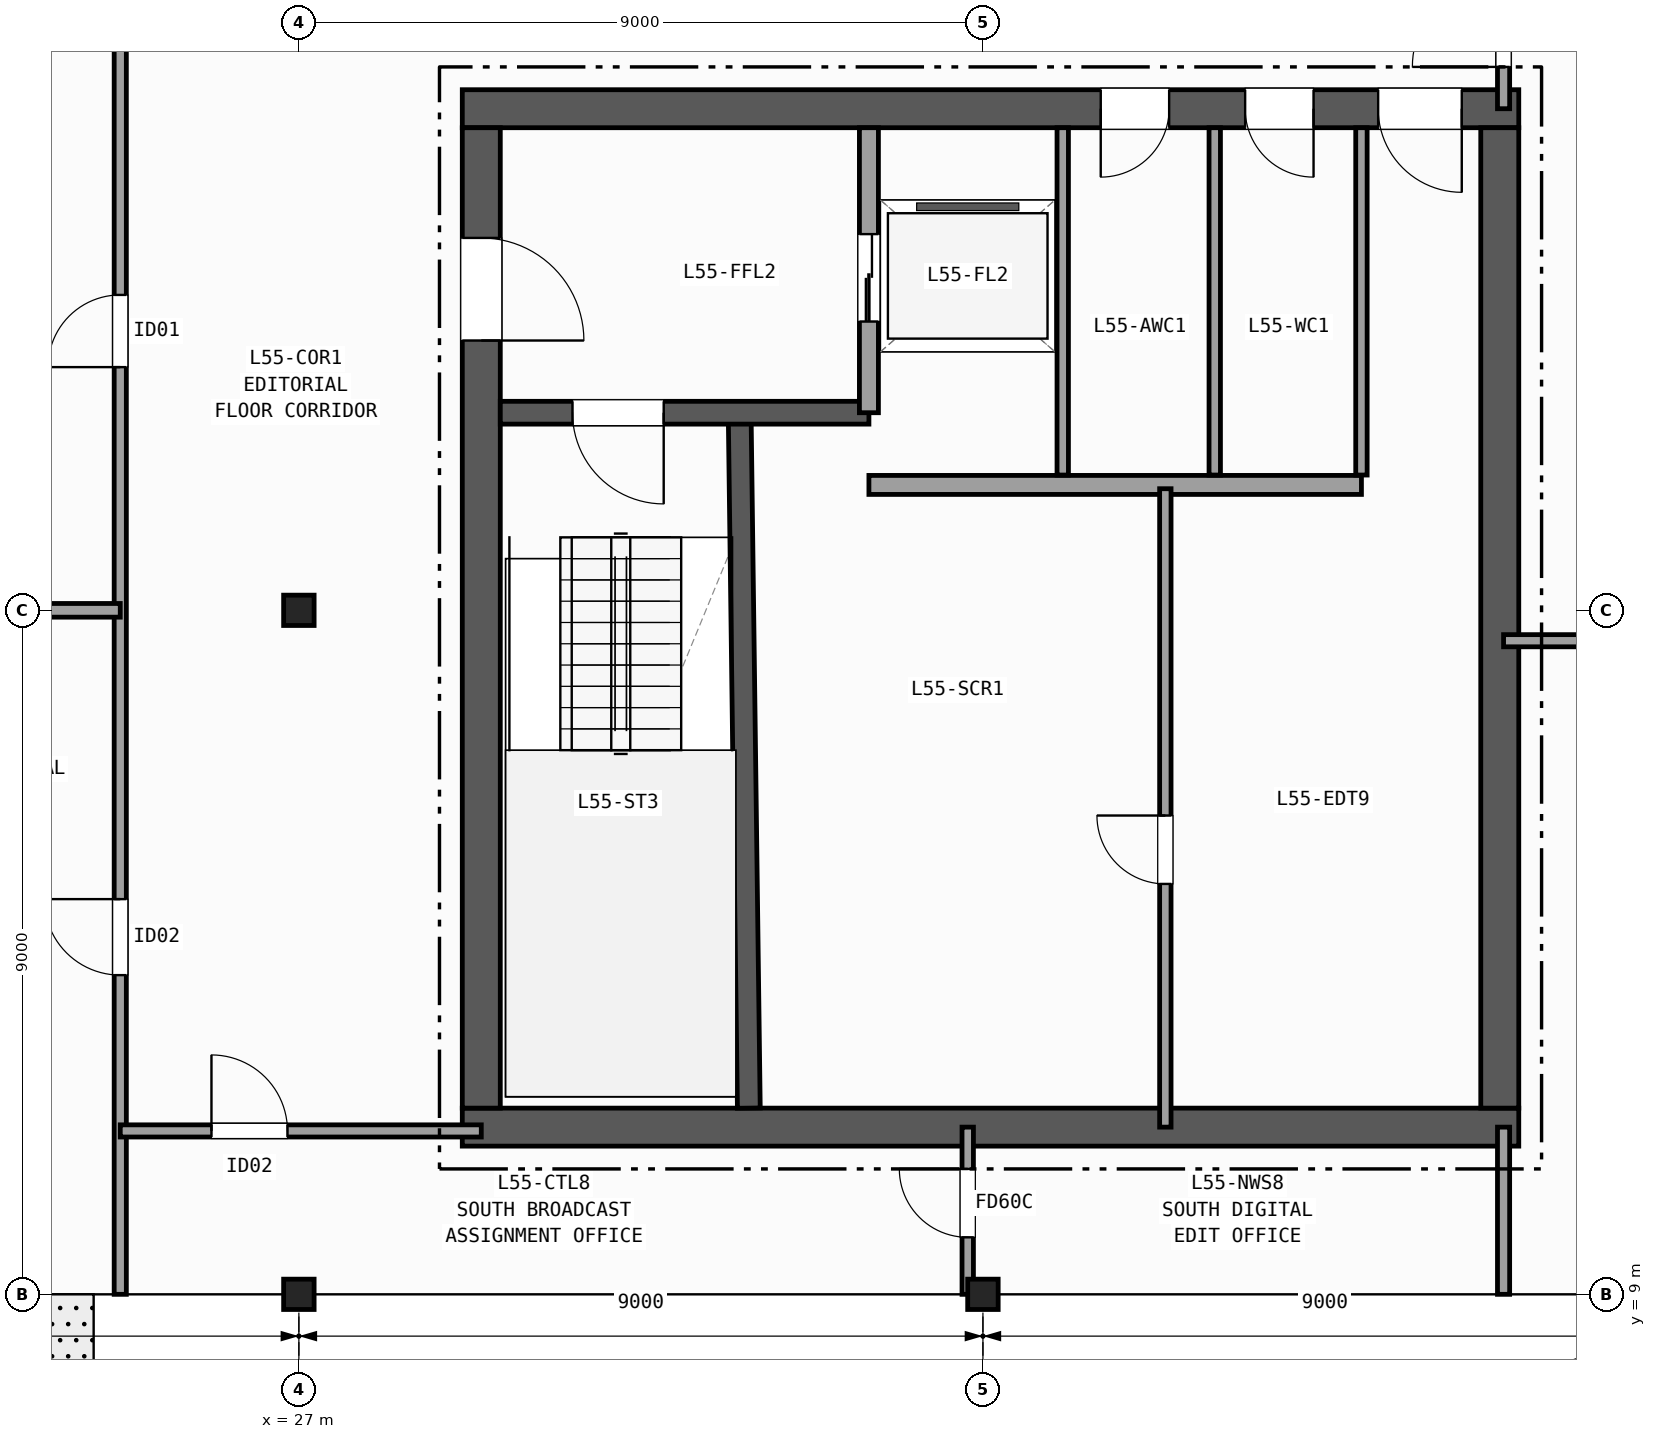
"""IFC4 building model, lengths in metres.
Left out: names, types, materials, properties, quantities, classifications, styles, units other than length and angle.
Written with IfcOpenShell. Run it as: python <this file> out.ifc"""

import sys

from ifc_helpers import new_model, si_unit, direction, frame, frame_2d, origin, origin_2d, place, context, subcontext, project, spatial, rectangle, i_section, extrude, element, fill, save


model = new_model("IFC4")
c1 = context("Model", 3, precision=1e-05, world=origin(), true_north=direction((0.0, 1.0)))
c2 = subcontext(c1, "Body", "Model", "MODEL_VIEW")
j1 = project(units=[si_unit("LENGTHUNIT", "METRE"), si_unit("PLANEANGLEUNIT", "RADIAN")], contexts=[c1])
p1 = place(None, origin())
s1 = spatial("IfcSite", under=j1, at=p1, CompositionType="ELEMENT")
p2 = place(p1, origin())
s2 = spatial("IfcBuilding", under=s1, at=p2, CompositionType="ELEMENT")
p3 = place(p2, frame((0.0, 0.0, 221.0)))
s3 = spatial("IfcBuildingStorey", under=s2, at=p3, CompositionType="ELEMENT", Elevation=221.0)
for number, where, z_axis, x_axis in (
    (1, (27.0, 9.0, 0.0), (0.0, 0.0, 1.0), (1.0, 0.0, 0.0)),
    (2, (27.0, 18.0, 0.0), (0.0, 0.0, 1.0), (1.0, 0.0, 0.0)),
    (3, (36.0, 9.0, 0.0), (0.0, 0.0, 1.0), (1.0, 0.0, 0.0)),
):
    element("IfcColumn", number, at=place(p3, frame(where, z_axis=z_axis, x_axis=x_axis)), inside=s3, PredefinedType="COLUMN", context=c2, shape_type="SweptSolid", body=[
        extrude(i_section(OverallWidth=0.401, OverallDepth=0.399, WebThickness=0.025, FlangeThickness=0.04, FilletRadius=0.015, at=origin_2d()), origin(), (0.0, 0.0, 1.0), 3.7),
    ])
p4 = place(p3, frame((29.15, 11.2, 0.0), z_axis=(0.0, 0.0, 1.0), x_axis=(1.0, 0.0, 0.0)))
e4 = element("IfcWall", 4, at=p4, inside=s3, PredefinedType="SHEAR", context=c2, shape_type="SweptSolid", body=[
    extrude(rectangle(XDim=13.9, YDim=0.5, at=frame_2d((6.95, 0.0))), origin(), (0.0, 0.0, 1.0), 3.42),
])
p5 = place(p3, frame((43.05, 24.6, 0.0), z_axis=(0.0, 0.0, 1.0), x_axis=(-1.0, 0.0, 0.0)))
e5 = element("IfcWall", 5, at=p5, inside=s3, PredefinedType="SHEAR", context=c2, shape_type="SweptSolid", body=[
    extrude(rectangle(XDim=13.9, YDim=0.5, at=frame_2d((6.95, 0.0))), origin(), (0.0, 0.0, 1.0), 3.42),
])
p6 = place(p5, frame((0.75, 0.0, 0.0)))
e6 = element("IfcOpeningElement", 6, at=p6, cuts=e5, PredefinedType="OPENING", context=c2, shape_type="SweptSolid", body=[
    extrude(rectangle(XDim=1.1, YDim=2.15, at=frame_2d((0.55, 1.075))), frame((0.0, 0.26, 0.0), z_axis=(0.0, -1.0, 0.0), x_axis=(1.0, 0.0, 0.0)), (0.0, 0.0, 1.0), 0.52),
])
p7 = place(p5, frame((2.7, 0.0, 0.0)))
e7 = element("IfcOpeningElement", 7, at=p7, cuts=e5, PredefinedType="OPENING", context=c2, shape_type="SweptSolid", body=[
    extrude(rectangle(XDim=0.9, YDim=2.1, at=frame_2d((0.45, 1.05))), frame((0.0, 0.26, 0.0), z_axis=(0.0, -1.0, 0.0), x_axis=(1.0, 0.0, 0.0)), (0.0, 0.0, 1.0), 0.52),
])
p8 = place(p5, frame((4.6, 0.0, 0.0)))
e8 = element("IfcOpeningElement", 8, at=p8, cuts=e5, PredefinedType="OPENING", context=c2, shape_type="SweptSolid", body=[
    extrude(rectangle(XDim=0.9, YDim=2.1, at=frame_2d((0.45, 1.05))), frame((0.0, 0.26, 0.0), z_axis=(0.0, -1.0, 0.0), x_axis=(1.0, 0.0, 0.0)), (0.0, 0.0, 1.0), 0.52),
])
p9 = place(p3, frame((29.4, 24.35, 0.0), z_axis=(0.0, 0.0, 1.0), x_axis=(0.0, -1.0, 0.0)))
e9 = element("IfcWall", 9, at=p9, inside=s3, PredefinedType="SHEAR", context=c2, shape_type="SweptSolid", body=[
    extrude(rectangle(XDim=12.9, YDim=0.5, at=frame_2d((6.45, 0.0))), origin(), (0.0, 0.0, 1.0), 3.42),
])
p10 = place(p9, frame((1.45, 0.0, 0.0)))
e10 = element("IfcOpeningElement", 10, at=p10, cuts=e9, PredefinedType="OPENING", context=c2, shape_type="SweptSolid", body=[
    extrude(rectangle(XDim=1.35, YDim=2.15, at=frame_2d((0.675, 1.075))), frame((0.0, 0.26, 0.0), z_axis=(0.0, -1.0, 0.0), x_axis=(1.0, 0.0, 0.0)), (0.0, 0.0, 1.0), 0.52),
])
p11 = place(p3, frame((42.8, 11.45, 0.0), z_axis=(0.0, 0.0, 1.0), x_axis=(0.0, 1.0, 0.0)))
e11 = element("IfcWall", 11, at=p11, inside=s3, PredefinedType="SHEAR", context=c2, shape_type="SweptSolid", body=[
    extrude(rectangle(XDim=12.9, YDim=0.5, at=frame_2d((6.45, 0.0))), origin(), (0.0, 0.0, 1.0), 3.42),
])
p12 = place(p3, frame((32.92, 11.45, 0.0), z_axis=(0.0, 0.0, 1.0), x_axis=(-0.013171578211, 0.999913251001, 0.0)))
e12 = element("IfcWall", 12, at=p12, inside=s3, PredefinedType="SHEAR", context=c2, shape_type="SweptSolid", body=[
    extrude(rectangle(XDim=9.101, YDim=0.3, at=frame_2d((4.55, 0.0))), origin(), (0.0, 0.0, 1.0), 3.42),
])
p13 = place(p3, frame((34.5, 20.6, 0.0), z_axis=(0.0, 0.0, 1.0), x_axis=(-1.0, 0.0, 0.0)))
e13 = element("IfcWall", 13, at=p13, inside=s3, PredefinedType="SHEAR", context=c2, shape_type="SweptSolid", body=[
    extrude(rectangle(XDim=4.85, YDim=0.3, at=frame_2d((2.425, 0.0))), origin(), (0.0, 0.0, 1.0), 3.42),
])
p14 = place(p13, frame((2.7, 0.0, 0.0)))
e14 = element("IfcOpeningElement", 14, at=p14, cuts=e13, PredefinedType="OPENING", context=c2, shape_type="SweptSolid", body=[
    extrude(rectangle(XDim=1.2, YDim=2.15, at=frame_2d((0.6, 1.075))), frame((0.0, 0.16, 0.0), z_axis=(0.0, -1.0, 0.0), x_axis=(1.0, 0.0, 0.0)), (0.0, 0.0, 1.0), 0.32),
])
p15 = place(p3, frame((34.5, 20.6, 0.0), z_axis=(0.0, 0.0, 1.0), x_axis=(0.0, 1.0, 0.0)))
e15 = element("IfcWall", 15, at=p15, inside=s3, PredefinedType="PARTITIONING", context=c2, shape_type="SweptSolid", body=[
    extrude(rectangle(XDim=3.75, YDim=0.25, at=frame_2d((1.875, 0.0))), origin(), (0.0, 0.0, 1.0), 3.42),
])
p16 = place(p15, frame((1.2, 0.0, 0.0)))
e16 = element("IfcOpeningElement", 16, at=p16, cuts=e15, PredefinedType="OPENING", context=c2, shape_type="SweptSolid", body=[
    extrude(rectangle(XDim=1.15, YDim=2.15, at=frame_2d((0.575, 1.075))), frame((0.0, 0.135, 0.0), z_axis=(0.0, -1.0, 0.0), x_axis=(1.0, 0.0, 0.0)), (0.0, 0.0, 1.0), 0.27),
])
p17 = place(p3, frame((34.5, 19.65, 0.0), z_axis=(0.0, 0.0, 1.0), x_axis=(1.0, 0.0, 0.0)))
e17 = element("IfcWall", 17, at=p17, inside=s3, PredefinedType="PARTITIONING", context=c2, shape_type="SweptSolid", body=[
    extrude(rectangle(XDim=6.48, YDim=0.25, at=frame_2d((3.24, 0.0))), origin(), (0.0, 0.0, 1.0), 3.42),
])
p18 = place(p3, frame((38.4, 11.2, 0.0), z_axis=(0.0, 0.0, 1.0), x_axis=(0.0, 1.0, 0.0)))
e18 = element("IfcWall", 18, at=p18, inside=s3, PredefinedType="PARTITIONING", context=c2, shape_type="SweptSolid", body=[
    extrude(rectangle(XDim=8.4, YDim=0.15, at=frame_2d((4.2, 0.0))), origin(), (0.0, 0.0, 1.0), 3.42),
])
p19 = place(p18, frame((3.2, 0.0, 0.0)))
e19 = element("IfcOpeningElement", 19, at=p19, cuts=e18, PredefinedType="OPENING", context=c2, shape_type="SweptSolid", body=[
    extrude(rectangle(XDim=0.9, YDim=2.1, at=frame_2d((0.45, 1.05))), frame((0.0, 0.085, 0.0), z_axis=(0.0, -1.0, 0.0), x_axis=(1.0, 0.0, 0.0)), (0.0, 0.0, 1.0), 0.17),
])
for number, where, z_axis, x_axis in (
    (20, (37.05, 19.78, 0.0), (0.0, 0.0, 1.0), (0.0, 1.0, 0.0)),
    (21, (39.05, 19.78, 0.0), (0.0, 0.0, 1.0), (0.0, 1.0, 0.0)),
    (22, (40.98, 19.78, 0.0), (0.0, 0.0, 1.0), (0.0, 1.0, 0.0)),
):
    element("IfcWall", number, at=place(p3, frame(where, z_axis=z_axis, x_axis=x_axis)), inside=s3, PredefinedType="PARTITIONING", context=c2, shape_type="SweptSolid", body=[
        extrude(rectangle(XDim=4.57, YDim=0.15, at=frame_2d((2.285, 0.0))), origin(), (0.0, 0.0, 1.0), 3.42),
    ])
p20 = place(p3, frame((24.65, 9.0, 0.0), z_axis=(0.0, 0.0, 1.0), x_axis=(0.0, 1.0, 0.0)))
e23 = element("IfcWall", 23, at=p20, inside=s3, PredefinedType="PARTITIONING", context=c2, shape_type="SweptSolid", body=[
    extrude(rectangle(XDim=19.2, YDim=0.16, at=frame_2d((9.6, 0.0))), origin(), (0.0, 0.0, 1.0), 2.707),
])
p21 = place(p20, frame((12.2, 0.0, 0.0)))
e24 = element("IfcOpeningElement", 24, at=p21, cuts=e23, PredefinedType="OPENING", context=c2, shape_type="SweptSolid", body=[
    extrude(rectangle(XDim=0.95, YDim=2.1, at=frame_2d((0.475, 1.05))), frame((0.0, 0.09, 0.0), z_axis=(0.0, -1.0, 0.0), x_axis=(1.0, 0.0, 0.0)), (0.0, 0.0, 1.0), 0.18),
])
p22 = place(p20, frame((4.2, 0.0, 0.0)))
e25 = element("IfcOpeningElement", 25, at=p22, cuts=e23, PredefinedType="OPENING", context=c2, shape_type="SweptSolid", body=[
    extrude(rectangle(XDim=1.0, YDim=2.1, at=frame_2d((0.5, 1.05))), frame((0.0, 0.09, 0.0), z_axis=(0.0, -1.0, 0.0), x_axis=(1.0, 0.0, 0.0)), (0.0, 0.0, 1.0), 0.18),
])
p23 = place(p3, frame((9.0, 18.0, 0.0), z_axis=(0.0, 0.0, 1.0), x_axis=(1.0, 0.0, 0.0)))
e26 = element("IfcWall", 26, at=p23, inside=s3, PredefinedType="PARTITIONING", context=c2, shape_type="SweptSolid", body=[
    extrude(rectangle(XDim=15.65, YDim=0.18, at=frame_2d((7.825, 0.0))), origin(), (0.0, 0.0, 1.0), 2.707),
])
p24 = place(p3, frame((24.65, 11.15, 0.0), z_axis=(0.0, 0.0, 1.0), x_axis=(1.0, 0.0, 0.0)))
e27 = element("IfcWall", 27, at=p24, inside=s3, PredefinedType="PARTITIONING", context=c2, shape_type="SweptSolid", body=[
    extrude(rectangle(XDim=4.75, YDim=0.16, at=frame_2d((2.375, 0.0))), origin(), (0.0, 0.0, 1.0), 2.792),
])
p25 = place(p24, frame((1.2, 0.0, 0.0)))
e28 = element("IfcOpeningElement", 28, at=p25, cuts=e27, PredefinedType="OPENING", context=c2, shape_type="SweptSolid", body=[
    extrude(rectangle(XDim=1.0, YDim=2.1, at=frame_2d((0.5, 1.05))), frame((0.0, 0.09, 0.0), z_axis=(0.0, -1.0, 0.0), x_axis=(1.0, 0.0, 0.0)), (0.0, 0.0, 1.0), 0.18),
])
p26 = place(p3, frame((35.8, 9.0, 0.0), z_axis=(0.0, 0.0, 1.0), x_axis=(0.0, 1.0, 0.0)))
e29 = element("IfcWall", 29, at=p26, inside=s3, PredefinedType="PARTITIONING", context=c2, shape_type="SweptSolid", body=[
    extrude(rectangle(XDim=2.2, YDim=0.15, at=frame_2d((1.1, 0.0))), origin(), (0.0, 0.0, 1.0), 2.707),
])
p27 = place(p26, frame((0.75, 0.0, 0.0)))
e30 = element("IfcOpeningElement", 30, at=p27, cuts=e29, PredefinedType="OPENING", context=c2, shape_type="SweptSolid", body=[
    extrude(rectangle(XDim=0.9, YDim=2.1, at=frame_2d((0.45, 1.05))), frame((0.0, 0.085, 0.0), z_axis=(0.0, -1.0, 0.0), x_axis=(1.0, 0.0, 0.0)), (0.0, 0.0, 1.0), 0.17),
])
p28 = place(p3, frame((42.85, 9.0, 0.0), z_axis=(0.0, 0.0, 1.0), x_axis=(0.0, 1.0, 0.0)))
e31 = element("IfcWall", 31, at=p28, inside=s3, PredefinedType="PARTITIONING", context=c2, shape_type="SweptSolid", body=[
    extrude(rectangle(XDim=2.2, YDim=0.16, at=frame_2d((1.1, 0.0))), origin(), (0.0, 0.0, 1.0), 2.707),
])
p29 = place(p3, frame((42.85, 24.6, 0.0), z_axis=(0.0, 0.0, 1.0), x_axis=(0.0, 1.0, 0.0)))
e32 = element("IfcWall", 32, at=p29, inside=s3, PredefinedType="PARTITIONING", context=c2, shape_type="SweptSolid", body=[
    extrude(rectangle(XDim=2.4, YDim=0.16, at=frame_2d((1.2, 0.0))), origin(), (0.0, 0.0, 1.0), 2.707),
])
p30 = place(p29, frame((0.55, 0.0, 0.0)))
e33 = element("IfcOpeningElement", 33, at=p30, cuts=e32, PredefinedType="OPENING", context=c2, shape_type="SweptSolid", body=[
    extrude(rectangle(XDim=1.2, YDim=2.15, at=frame_2d((0.6, 1.075))), frame((0.0, 0.09, 0.0), z_axis=(0.0, -1.0, 0.0), x_axis=(1.0, 0.0, 0.0)), (0.0, 0.0, 1.0), 0.18),
])
p31 = place(p3, frame((42.85, 17.6, 0.0), z_axis=(0.0, 0.0, 1.0), x_axis=(1.0, 0.0, 0.0)))
e34 = element("IfcWall", 34, at=p31, inside=s3, PredefinedType="PARTITIONING", context=c2, shape_type="SweptSolid", body=[
    extrude(rectangle(XDim=11.15, YDim=0.16, at=frame_2d((5.575, 0.0))), origin(), (0.0, 0.0, 1.0), 3.42),
])
p32 = place(p31, frame((2.95, 0.0, 0.0)))
e35 = element("IfcOpeningElement", 35, at=p32, cuts=e34, PredefinedType="OPENING", context=c2, shape_type="SweptSolid", body=[
    extrude(rectangle(XDim=0.86, YDim=2.05, at=frame_2d((0.43, 1.025))), frame((0.0, 0.09, 0.0), z_axis=(0.0, -1.0, 0.0), x_axis=(1.0, 0.0, 0.0)), (0.0, 0.0, 1.0), 0.18),
])
p33 = place(p14, origin())
e36 = element("IfcDoor", 36, at=p33, inside=s3, OperationType="SINGLE_SWING_LEFT", PredefinedType="DOOR", context=c2, shape_type="SweptSolid", body=[
    extrude(rectangle(XDim=1.2, YDim=2.15, at=frame_2d((0.6, 1.075))), frame((0.0, 0.025, 0.0), z_axis=(0.0, -1.0, 0.0), x_axis=(1.0, 0.0, 0.0)), (0.0, 0.0, 1.0), 0.05),
])
fill(e14, e36)
p34 = place(p10, origin())
e37 = element("IfcDoor", 37, at=p34, inside=s3, OperationType="SINGLE_SWING_RIGHT", PredefinedType="DOOR", context=c2, shape_type="SweptSolid", body=[
    extrude(rectangle(XDim=1.35, YDim=2.15, at=frame_2d((0.675, 1.075))), frame((0.0, 0.025, 0.0), z_axis=(0.0, -1.0, 0.0), x_axis=(1.0, 0.0, 0.0)), (0.0, 0.0, 1.0), 0.05),
])
fill(e10, e37)
p35 = place(p6, origin())
e38 = element("IfcDoor", 38, at=p35, inside=s3, OperationType="SINGLE_SWING_LEFT", PredefinedType="DOOR", context=c2, shape_type="SweptSolid", body=[
    extrude(rectangle(XDim=1.1, YDim=2.15, at=frame_2d((0.55, 1.075))), frame((0.0, 0.025, 0.0), z_axis=(0.0, -1.0, 0.0), x_axis=(1.0, 0.0, 0.0)), (0.0, 0.0, 1.0), 0.05),
])
fill(e6, e38)
p36 = place(p7, origin())
e39 = element("IfcDoor", 39, at=p36, inside=s3, OperationType="SINGLE_SWING_LEFT", PredefinedType="DOOR", context=c2, shape_type="SweptSolid", body=[
    extrude(rectangle(XDim=0.9, YDim=2.1, at=frame_2d((0.45, 1.05))), frame((0.0, 0.025, 0.0), z_axis=(0.0, -1.0, 0.0), x_axis=(1.0, 0.0, 0.0)), (0.0, 0.0, 1.0), 0.05),
])
fill(e7, e39)
p37 = place(p8, origin())
e40 = element("IfcDoor", 40, at=p37, inside=s3, OperationType="SINGLE_SWING_RIGHT", PredefinedType="DOOR", context=c2, shape_type="SweptSolid", body=[
    extrude(rectangle(XDim=0.9, YDim=2.1, at=frame_2d((0.45, 1.05))), frame((0.0, 0.025, 0.0), z_axis=(0.0, -1.0, 0.0), x_axis=(1.0, 0.0, 0.0)), (0.0, 0.0, 1.0), 0.05),
])
fill(e8, e40)
p38 = place(p16, origin())
e41 = element("IfcDoor", 41, at=p38, inside=s3, OperationType="DOUBLE_DOOR_SLIDING", PredefinedType="DOOR", context=c2, shape_type="SweptSolid", body=[
    extrude(rectangle(XDim=1.15, YDim=2.15, at=frame_2d((0.575, 1.075))), frame((0.0, 0.025, 0.0), z_axis=(0.0, -1.0, 0.0), x_axis=(1.0, 0.0, 0.0)), (0.0, 0.0, 1.0), 0.05),
])
fill(e16, e41)
p39 = place(p19, origin())
e42 = element("IfcDoor", 42, at=p39, inside=s3, OperationType="SINGLE_SWING_RIGHT", PredefinedType="DOOR", context=c2, shape_type="SweptSolid", body=[
    extrude(rectangle(XDim=0.9, YDim=2.1, at=frame_2d((0.45, 1.05))), frame((0.0, 0.025, 0.0), z_axis=(0.0, -1.0, 0.0), x_axis=(1.0, 0.0, 0.0)), (0.0, 0.0, 1.0), 0.05),
])
fill(e19, e42)
p40 = place(p21, origin())
e43 = element("IfcDoor", 43, at=p40, inside=s3, OperationType="SINGLE_SWING_LEFT", PredefinedType="DOOR", context=c2, shape_type="SweptSolid", body=[
    extrude(rectangle(XDim=0.95, YDim=2.1, at=frame_2d((0.475, 1.05))), frame((0.0, 0.025, 0.0), z_axis=(0.0, -1.0, 0.0), x_axis=(1.0, 0.0, 0.0)), (0.0, 0.0, 1.0), 0.05),
])
fill(e24, e43)
p41 = place(p22, origin())
e44 = element("IfcDoor", 44, at=p41, inside=s3, OperationType="SINGLE_SWING_RIGHT", PredefinedType="DOOR", context=c2, shape_type="SweptSolid", body=[
    extrude(rectangle(XDim=1.0, YDim=2.1, at=frame_2d((0.5, 1.05))), frame((0.0, 0.025, 0.0), z_axis=(0.0, -1.0, 0.0), x_axis=(1.0, 0.0, 0.0)), (0.0, 0.0, 1.0), 0.05),
])
fill(e25, e44)
p42 = place(p25, origin())
e45 = element("IfcDoor", 45, at=p42, inside=s3, OperationType="SINGLE_SWING_LEFT", PredefinedType="DOOR", context=c2, shape_type="SweptSolid", body=[
    extrude(rectangle(XDim=1.0, YDim=2.1, at=frame_2d((0.5, 1.05))), frame((0.0, 0.025, 0.0), z_axis=(0.0, -1.0, 0.0), x_axis=(1.0, 0.0, 0.0)), (0.0, 0.0, 1.0), 0.05),
])
fill(e28, e45)
p43 = place(p27, origin())
e46 = element("IfcDoor", 46, at=p43, inside=s3, OperationType="SINGLE_SWING_RIGHT", PredefinedType="DOOR", context=c2, shape_type="SweptSolid", body=[
    extrude(rectangle(XDim=0.9, YDim=2.1, at=frame_2d((0.45, 1.05))), frame((0.0, 0.025, 0.0), z_axis=(0.0, -1.0, 0.0), x_axis=(1.0, 0.0, 0.0)), (0.0, 0.0, 1.0), 0.05),
])
fill(e30, e46)
p44 = place(p30, origin())
e47 = element("IfcDoor", 47, at=p44, inside=s3, OperationType="SINGLE_SWING_LEFT", PredefinedType="DOOR", context=c2, shape_type="SweptSolid", body=[
    extrude(rectangle(XDim=1.2, YDim=2.15, at=frame_2d((0.6, 1.075))), frame((0.0, 0.025, 0.0), z_axis=(0.0, -1.0, 0.0), x_axis=(1.0, 0.0, 0.0)), (0.0, 0.0, 1.0), 0.05),
])
fill(e33, e47)
save(model, sys.argv[1])
